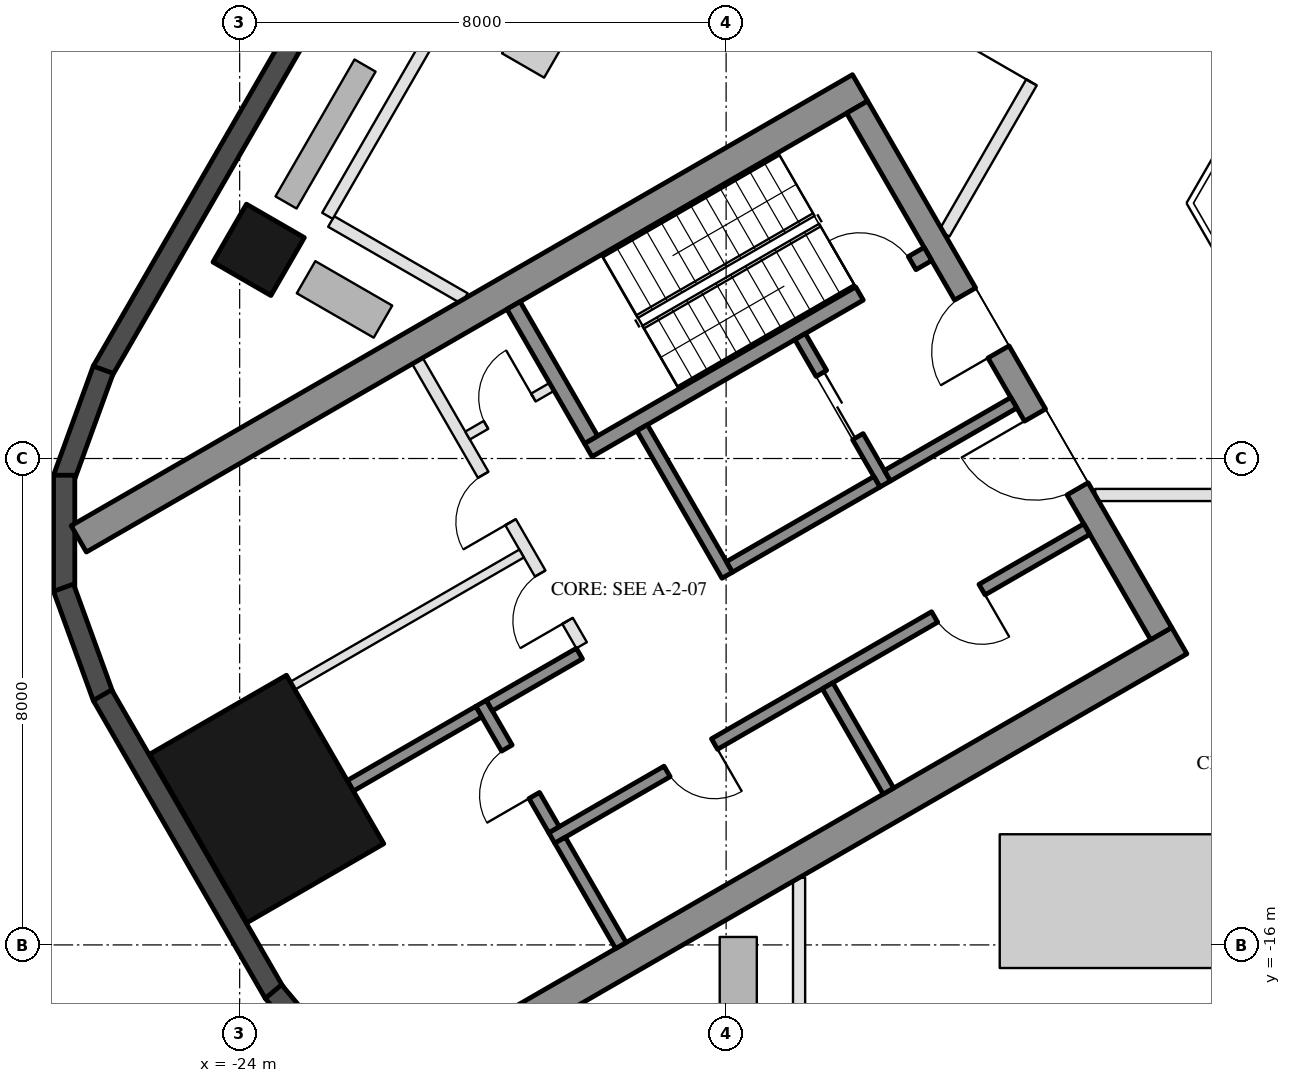
"""IFC4 building model, lengths in metres.
Left out: names, types, materials, properties, quantities, classifications, styles, units other than length and angle.
Written with IfcOpenShell. Run it as: python <this file> out.ifc"""

import sys

from ifc_helpers import new_model, si_unit, direction, frame, frame_2d, origin, origin_2d, place, context, subcontext, project, spatial, rectangle, hollow_rectangle, extrude, boolean, halfspace, element, fill, save


model = new_model("IFC4")
c1 = context("Model", 3, precision=1e-05, world=origin(), true_north=direction((0.0, 1.0)))
c2 = subcontext(c1, "Body", "Model", "MODEL_VIEW")
j1 = project(units=[si_unit("LENGTHUNIT", "METRE"), si_unit("PLANEANGLEUNIT", "RADIAN")], contexts=[c1])
p1 = place(None, origin())
s1 = spatial("IfcSite", under=j1, at=p1, CompositionType="ELEMENT")
p2 = place(p1, origin())
s2 = spatial("IfcBuilding", under=s1, at=p2, CompositionType="ELEMENT")
p3 = place(p2, frame((0.0, 0.0, 37.5)))
s3 = spatial("IfcBuildingStorey", under=s2, at=p3, CompositionType="ELEMENT", Elevation=37.5)
p4 = place(p3, frame((-23.688, -4.568, 0.0), z_axis=(0.0, 0.0, 1.0), x_axis=(0.5, 0.866025403784, 0.0)))
e1 = element("IfcColumn", 1, at=p4, inside=s3, PredefinedType="COLUMN", context=c2, shape_type="SweptSolid", body=[
    boolean("DIFFERENCE", extrude(hollow_rectangle(XDim=1.1, YDim=1.1, WallThickness=0.05, at=origin_2d()), origin(), (0.0, 0.0, 1.0), 4.5), halfspace(frame((0.0, 0.0, 0.007), z_axis=(0.0, 0.0, 1.0), x_axis=(1.0, 0.0, 0.0)), True)),
])
p5 = place(p3, frame((-23.556, -13.6, 0.0), z_axis=(0.0, 0.0, 1.0), x_axis=(-0.5, 0.866025403784, 0.0)))
e2 = element("IfcColumn", 2, at=p5, inside=s3, PredefinedType="COLUMN", context=c2, shape_type="SweptSolid", body=[
    extrude(hollow_rectangle(XDim=3.2, YDim=2.6, WallThickness=0.08, at=origin_2d()), origin(), (0.0, 0.0, 1.0), 4.5),
])
p6 = place(p3, frame((-7.441, 26.022, 0.0), z_axis=(0.0, 0.0, 1.0), x_axis=(-0.499998380999, -0.866026338513, 0.0)))
e3 = element("IfcWall", 3, at=p6, inside=s3, PredefinedType="SOLIDWALL", context=c2, shape_type="SweptSolid", body=[
    extrude(rectangle(XDim=37.631, YDim=0.35, at=frame_2d((18.816, 0.0))), origin(), (0.0, 0.0, 1.0), 4.2),
])
for number, where, z_axis, x_axis in (
    (4, (-26.244, -6.54, 0.0), (0.0, 0.0, 1.0), (-0.342, -0.94, 0.0)),
    (5, (-26.886, -8.275, 0.0), (0.0, 0.0, 1.0), (0.0, -1.0, 0.0)),
    (6, (-26.897, -10.125, 0.0), (0.0, 0.0, 1.0), (0.342, -0.94, 0.0)),
):
    element("IfcWall", number, at=place(p3, frame(where, z_axis=z_axis, x_axis=x_axis)), inside=s3, PredefinedType="SOLIDWALL", context=c2, shape_type="SweptSolid", body=[
        extrude(rectangle(XDim=1.91, YDim=0.35, at=frame_2d((0.955, 0.0))), origin(), (0.0, 0.0, 1.0), 4.2),
    ])
p7 = place(p3, frame((-26.256, -11.893, 0.0), z_axis=(0.0, 0.0, 1.0), x_axis=(0.499986410639, -0.866033249463, 0.0)))
e7 = element("IfcWall", 7, at=p7, inside=s3, PredefinedType="SOLIDWALL", context=c2, shape_type="SweptSolid", body=[
    extrude(rectangle(XDim=5.658, YDim=0.35, at=frame_2d((2.829, 0.0))), origin(), (0.0, 0.0, 1.0), 4.2),
])
p8 = place(p3, frame((-23.445, -16.768, 0.0), z_axis=(0.0, 0.0, 1.0), x_axis=(0.642808304945, -0.766027077259, 0.0)))
e8 = element("IfcWall", 8, at=p8, inside=s3, PredefinedType="SOLIDWALL", context=c2, shape_type="SweptSolid", body=[
    extrude(rectangle(XDim=1.91, YDim=0.35, at=frame_2d((0.955, 0.0))), origin(), (0.0, 0.0, 1.0), 4.2),
])
for number, where, z_axis, x_axis in (
    (9, (-13.797, -1.903, 0.0), (0.0, 0.0, 1.0), (-0.866, -0.5, 0.0)),
    (10, (-8.547, -10.997, 0.0), (0.0, 0.0, 1.0), (-0.866, -0.5, 0.0)),
):
    element("IfcWall", number, at=place(p3, frame(where, z_axis=z_axis, x_axis=x_axis)), inside=s3, PredefinedType="SHEAR", context=c2, shape_type="SweptSolid", body=[
        extrude(rectangle(XDim=14.837, YDim=0.5, at=frame_2d((7.418, 0.0))), origin(), (0.0, 0.0, 1.0), 4.2),
    ])
p9 = place(p3, frame((-13.845, -2.22, 0.0), z_axis=(0.0, 0.0, 1.0), x_axis=(0.500004234368, -0.866022959057, 0.0)))
e11 = element("IfcWall", 11, at=p9, inside=s3, PredefinedType="SHEAR", context=c2, shape_type="SweptSolid", body=[
    extrude(rectangle(XDim=10.0, YDim=0.4, at=frame_2d((5.0, 0.0))), origin(), (0.0, 0.0, 1.0), 4.2),
])
p10 = place(p9, frame((3.55, 0.0, 0.0)))
e12 = element("IfcOpeningElement", 12, at=p10, cuts=e11, PredefinedType="OPENING", context=c2, shape_type="SweptSolid", body=[
    extrude(rectangle(XDim=1.1, YDim=2.1, at=frame_2d((0.55, 1.05))), frame((0.0, 0.21, 0.0), z_axis=(0.0, -1.0, 0.0), x_axis=(1.0, 0.0, 0.0)), (0.0, 0.0, 1.0), 0.42),
])
p11 = place(p9, frame((5.85, 0.0, 0.0)))
e13 = element("IfcOpeningElement", 13, at=p11, cuts=e11, PredefinedType="OPENING", context=c2, shape_type="SweptSolid", body=[
    extrude(rectangle(XDim=1.4, YDim=2.1, at=frame_2d((0.7, 1.05))), frame((0.0, 0.21, 0.0), z_axis=(0.0, -1.0, 0.0), x_axis=(1.0, 0.0, 0.0)), (0.0, 0.0, 1.0), 0.42),
])
p12 = place(p3, frame((-12.681, -4.636, 0.0), z_axis=(0.0, 0.0, 1.0), x_axis=(-0.866021702275, -0.500006411147, 0.0)))
e14 = element("IfcWall", 14, at=p12, inside=s3, PredefinedType="SHEAR", context=c2, shape_type="SweptSolid", body=[
    extrude(rectangle(XDim=6.45, YDim=0.25, at=frame_2d((3.225, 0.0))), origin(), (0.0, 0.0, 1.0), 4.2),
])
p13 = place(p12, frame((0.3, 0.0, 0.0)))
e15 = element("IfcOpeningElement", 15, at=p13, cuts=e14, PredefinedType="OPENING", context=c2, shape_type="SweptSolid", body=[
    extrude(rectangle(XDim=1.0, YDim=2.1, at=frame_2d((0.5, 1.05))), frame((0.0, 0.135, 0.0), z_axis=(0.0, -1.0, 0.0), x_axis=(1.0, 0.0, 0.0)), (0.0, 0.0, 1.0), 0.27),
])
p14 = place(p3, frame((-19.496, -5.482, 0.0), z_axis=(0.0, 0.0, 1.0), x_axis=(0.499990435942, -0.866030925526, 0.0)))
e16 = element("IfcWall", 16, at=p14, inside=s3, PredefinedType="SHEAR", context=c2, shape_type="SweptSolid", body=[
    extrude(rectangle(XDim=2.55, YDim=0.25, at=frame_2d((1.275, 0.0))), origin(), (0.0, 0.0, 1.0), 4.2),
])
p15 = place(p3, frame((-17.381, -7.495, 0.0), z_axis=(0.0, 0.0, 1.0), x_axis=(0.500011755427, -0.866018616679, 0.0)))
e17 = element("IfcWall", 17, at=p15, inside=s3, PredefinedType="SHEAR", context=c2, shape_type="SweptSolid", body=[
    extrude(rectangle(XDim=2.8, YDim=0.2, at=frame_2d((1.4, 0.0))), origin(), (0.0, 0.0, 1.0), 4.2),
])
p16 = place(p3, frame((-14.783, -5.995, 0.0), z_axis=(0.0, 0.0, 1.0), x_axis=(0.49994636267, -0.866056369097, 0.0)))
e18 = element("IfcWall", 18, at=p16, inside=s3, PredefinedType="SHEAR", context=c2, shape_type="SweptSolid", body=[
    extrude(rectangle(XDim=2.8, YDim=0.2, at=frame_2d((1.4, 0.0))), origin(), (0.0, 0.0, 1.0), 4.2),
])
p17 = place(p16, frame((0.7, 0.0, 0.0)))
e19 = element("IfcOpeningElement", 19, at=p17, cuts=e18, PredefinedType="OPENING", context=c2, shape_type="SweptSolid", body=[
    extrude(rectangle(XDim=1.2, YDim=2.1, at=frame_2d((0.6, 1.05))), frame((0.0, 0.11, 0.0), z_axis=(0.0, -1.0, 0.0), x_axis=(1.0, 0.0, 0.0)), (0.0, 0.0, 1.0), 0.22),
])
p18 = place(p3, frame((-13.52, -8.383, 0.0), z_axis=(0.0, 0.0, 1.0), x_axis=(-0.866034573852, -0.49998411664, 0.0)))
e20 = element("IfcWall", 20, at=p18, inside=s3, PredefinedType="SHEAR", context=c2, shape_type="SweptSolid", body=[
    extrude(rectangle(XDim=2.8, YDim=0.2, at=frame_2d((1.4, 0.0))), origin(), (0.0, 0.0, 1.0), 4.2),
])
p19 = place(p3, frame((-11.268, -7.083, 0.0), z_axis=(0.0, 0.0, 1.0), x_axis=(-0.866050077142, -0.499957262057, 0.0)))
e21 = element("IfcWall", 21, at=p19, inside=s3, PredefinedType="SHEAR", context=c2, shape_type="SweptSolid", body=[
    extrude(rectangle(XDim=2.4, YDim=0.2, at=frame_2d((1.2, 0.0))), origin(), (0.0, 0.0, 1.0), 4.2),
])
p20 = place(p3, frame((-10.068, -9.162, 0.0), z_axis=(0.0, 0.0, 1.0), x_axis=(-0.866032725843, -0.499987317609, 0.0)))
e22 = element("IfcWall", 22, at=p20, inside=s3, PredefinedType="SHEAR", context=c2, shape_type="SweptSolid", body=[
    extrude(rectangle(XDim=10.16, YDim=0.2, at=frame_2d((5.08, 0.0))), origin(), (0.0, 0.0, 1.0), 4.2),
])
p21 = place(p20, frame((1.99, 0.0, 0.0)))
e23 = element("IfcOpeningElement", 23, at=p21, cuts=e22, PredefinedType="OPENING", context=c2, shape_type="SweptSolid", body=[
    extrude(rectangle(XDim=0.9, YDim=2.1, at=frame_2d((0.45, 1.05))), frame((0.0, 0.11, 0.0), z_axis=(0.0, -1.0, 0.0), x_axis=(1.0, 0.0, 0.0)), (0.0, 0.0, 1.0), 0.22),
])
p22 = place(p20, frame((7.07, 0.0, 0.0)))
e24 = element("IfcOpeningElement", 24, at=p22, cuts=e22, PredefinedType="OPENING", context=c2, shape_type="SweptSolid", body=[
    extrude(rectangle(XDim=0.9, YDim=2.1, at=frame_2d((0.45, 1.05))), frame((0.0, 0.11, 0.0), z_axis=(0.0, -1.0, 0.0), x_axis=(1.0, 0.0, 0.0)), (0.0, 0.0, 1.0), 0.22),
])
p23 = place(p3, frame((-20.031, -12.026, 0.0), z_axis=(0.0, 0.0, 1.0), x_axis=(0.500033551112, -0.866006032174, 0.0)))
e25 = element("IfcWall", 25, at=p23, inside=s3, PredefinedType="SHEAR", context=c2, shape_type="SweptSolid", body=[
    extrude(rectangle(XDim=2.4, YDim=0.2, at=frame_2d((1.2, 0.0))), origin(), (0.0, 0.0, 1.0), 4.2),
])
p24 = place(p23, frame((0.85, 0.0, 0.0)))
e26 = element("IfcOpeningElement", 26, at=p24, cuts=e25, PredefinedType="OPENING", context=c2, shape_type="SweptSolid", body=[
    extrude(rectangle(XDim=0.9, YDim=2.1, at=frame_2d((0.45, 1.05))), frame((0.0, 0.11, 0.0), z_axis=(0.0, -1.0, 0.0), x_axis=(1.0, 0.0, 0.0)), (0.0, 0.0, 1.0), 0.22),
])
p25 = place(p3, frame((-18.413, -11.208, 0.0), z_axis=(0.0, 0.0, 1.0), x_axis=(-0.866038183914, -0.499977863513, 0.0)))
e27 = element("IfcWall", 27, at=p25, inside=s3, PredefinedType="SHEAR", context=c2, shape_type="SweptSolid", body=[
    extrude(rectangle(XDim=1.71, YDim=0.2, at=frame_2d((0.855, 0.0))), origin(), (0.0, 0.0, 1.0), 4.2),
])
for number, where, z_axis, x_axis in (
    (28, (-14.331, -11.738, 0.0), (0.0, 0.0, 1.0), (0.5, -0.866, 0.0)),
    (29, (-18.73, -14.278, 0.0), (0.0, 0.0, 1.0), (0.5, -0.866, 0.0)),
):
    element("IfcWall", number, at=place(p3, frame(where, z_axis=z_axis, x_axis=x_axis)), inside=s3, PredefinedType="SHEAR", context=c2, shape_type="SweptSolid", body=[
        extrude(rectangle(XDim=2.0, YDim=0.2, at=frame_2d((1.0, 0.0))), origin(), (0.0, 0.0, 1.0), 4.2),
    ])
p26 = place(p3, frame((-20.067, -12.163, 0.0), z_axis=(0.0, 0.0, 1.0), x_axis=(-0.866048967903, -0.499959183527, 0.0)))
e30 = element("IfcWall", 30, at=p26, inside=s3, PredefinedType="SHEAR", context=c2, shape_type="SweptSolid", body=[
    extrude(rectangle(XDim=2.44, YDim=0.2, at=frame_2d((1.22, 0.0))), origin(), (0.0, 0.0, 1.0), 4.2),
])
p27 = place(p3, frame((-21.076, -6.395, 0.0), z_axis=(0.0, 0.0, 1.0), x_axis=(0.50001468107, -0.866016927499, 0.0)))
e31 = element("IfcWall", 31, at=p27, inside=s3, PredefinedType="PARTITIONING", context=c2, shape_type="SweptSolid", body=[
    extrude(rectangle(XDim=5.4, YDim=0.2, at=frame_2d((2.7, 0.0))), origin(), (0.0, 0.0, 1.0), 4.2),
])
p28 = place(p27, frame((2.163, 0.0, 0.0)))
e32 = element("IfcOpeningElement", 32, at=p28, cuts=e31, PredefinedType="OPENING", context=c2, shape_type="SweptSolid", body=[
    extrude(rectangle(XDim=0.9, YDim=2.1, at=frame_2d((0.45, 1.05))), frame((0.0, 0.11, 0.0), z_axis=(0.0, -1.0, 0.0), x_axis=(1.0, 0.0, 0.0)), (0.0, 0.0, 1.0), 0.22),
])
p29 = place(p27, frame((4.038, 0.0, 0.0)))
e33 = element("IfcOpeningElement", 33, at=p29, cuts=e31, PredefinedType="OPENING", context=c2, shape_type="SweptSolid", body=[
    extrude(rectangle(XDim=0.9, YDim=2.1, at=frame_2d((0.45, 1.05))), frame((0.0, 0.11, 0.0), z_axis=(0.0, -1.0, 0.0), x_axis=(1.0, 0.0, 0.0)), (0.0, 0.0, 1.0), 0.22),
])
p30 = place(p3, frame((-18.866, -6.822, 0.0), z_axis=(0.0, 0.0, 1.0), x_axis=(-0.866028054938, -0.499995408039, 0.0)))
e34 = element("IfcWall", 34, at=p30, inside=s3, PredefinedType="PARTITIONING", context=c2, shape_type="SweptSolid", body=[
    extrude(rectangle(XDim=1.6, YDim=0.15, at=frame_2d((0.8, 0.0))), origin(), (0.0, 0.0, 1.0), 4.2),
])
p31 = place(p30, frame((0.35, 0.0, 0.0)))
e35 = element("IfcOpeningElement", 35, at=p31, cuts=e34, PredefinedType="OPENING", context=c2, shape_type="SweptSolid", body=[
    extrude(rectangle(XDim=0.9, YDim=2.1, at=frame_2d((0.45, 1.05))), frame((0.0, 0.085, 0.0), z_axis=(0.0, -1.0, 0.0), x_axis=(1.0, 0.0, 0.0)), (0.0, 0.0, 1.0), 0.17),
])
p32 = place(p3, frame((-19.363, -9.562, 0.0), z_axis=(0.0, 0.0, 1.0), x_axis=(-0.866027639635, -0.499996127374, 0.0)))
e36 = element("IfcWall", 36, at=p32, inside=s3, PredefinedType="PARTITIONING", context=c2, shape_type="SweptSolid", body=[
    extrude(rectangle(XDim=4.35, YDim=0.15, at=frame_2d((2.175, 0.0))), origin(), (0.0, 0.0, 1.0), 4.2),
])
p33 = place(p3, frame((-14.8, -17.43, 0.0), z_axis=(0.0, 0.0, 1.0), x_axis=(0.0, 1.0, 0.0)))
e37 = element("IfcWall", 37, at=p33, inside=s3, PredefinedType="PARTITIONING", context=c2, shape_type="SweptSolid", body=[
    extrude(rectangle(XDim=2.534, YDim=0.2, at=frame_2d((1.267, 0.0))), origin(), (0.0, 0.0, 1.0), 4.2),
])
p34 = place(p3, frame((-9.93, -8.6, 0.0), z_axis=(0.0, 0.0, 1.0), x_axis=(1.0, 0.0, 0.0)))
e38 = element("IfcWall", 38, at=p34, inside=s3, PredefinedType="PARTITIONING", context=c2, shape_type="SweptSolid", body=[
    extrude(rectangle(XDim=19.861, YDim=0.2, at=frame_2d((9.93, 0.0))), origin(), (0.0, 0.0, 1.0), 3.41),
])
p35 = place(p34, frame((2.871, 0.0, 0.0)))
e39 = element("IfcOpeningElement", 39, at=p35, cuts=e38, PredefinedType="OPENING", context=c2, shape_type="SweptSolid", body=[
    extrude(rectangle(XDim=1.2, YDim=2.1, at=frame_2d((0.6, 1.05))), frame((0.0, 0.11, 0.0), z_axis=(0.0, -1.0, 0.0), x_axis=(1.0, 0.0, 0.0)), (0.0, 0.0, 1.0), 0.22),
])
p36 = place(p34, frame((9.581, 0.0, 0.0)))
e40 = element("IfcOpeningElement", 40, at=p36, cuts=e38, PredefinedType="OPENING", context=c2, shape_type="SweptSolid", body=[
    extrude(rectangle(XDim=1.2, YDim=2.1, at=frame_2d((0.6, 1.05))), frame((0.0, 0.11, 0.0), z_axis=(0.0, -1.0, 0.0), x_axis=(1.0, 0.0, 0.0)), (0.0, 0.0, 1.0), 0.22),
])
p37 = place(p34, frame((16.04, 0.0, 0.0)))
e41 = element("IfcOpeningElement", 41, at=p37, cuts=e38, PredefinedType="OPENING", context=c2, shape_type="SweptSolid", body=[
    extrude(rectangle(XDim=1.2, YDim=2.1, at=frame_2d((0.6, 1.05))), frame((0.0, 0.11, 0.0), z_axis=(0.0, -1.0, 0.0), x_axis=(1.0, 0.0, 0.0)), (0.0, 0.0, 1.0), 0.22),
])
p38 = place(p3, frame((-22.495, -4.102, 0.0), z_axis=(0.0, 0.0, 1.0), x_axis=(0.866065287345, -0.499930913282, 0.0)))
e42 = element("IfcWall", 42, at=p38, inside=s3, PredefinedType="PARTITIONING", context=c2, shape_type="SweptSolid", body=[
    extrude(rectangle(XDim=2.534, YDim=0.2, at=frame_2d((1.267, 0.0))), origin(), (0.0, 0.0, 1.0), 4.2),
])
p39 = place(p3, frame((-7.806, 21.539, 0.0), z_axis=(0.0, 0.0, 1.0), x_axis=(-0.500002084189, -0.866024200474, 0.0)))
e43 = element("IfcWall", 43, at=p39, inside=s3, PredefinedType="PARTITIONING", context=c2, shape_type="SweptSolid", body=[
    extrude(rectangle(XDim=29.5, YDim=0.2, at=frame_2d((14.75, 0.0))), origin(), (0.0, 0.0, 1.0), 3.41),
])
p40 = place(p3, frame((-2.482, 12.9, 0.0), z_axis=(0.0, 0.0, 1.0), x_axis=(-0.50000478328, -0.866022642139, 0.0)))
e44 = element("IfcWall", 44, at=p40, inside=s3, PredefinedType="PARTITIONING", context=c2, shape_type="SweptSolid", body=[
    extrude(rectangle(XDim=19.861, YDim=0.2, at=frame_2d((9.931, 0.0))), origin(), (0.0, 0.0, 1.0), 3.41),
])
p41 = place(p40, frame((3.121, 0.0, 0.0)))
e45 = element("IfcOpeningElement", 45, at=p41, cuts=e44, PredefinedType="OPENING", context=c2, shape_type="SweptSolid", body=[
    extrude(rectangle(XDim=1.2, YDim=2.1, at=frame_2d((0.6, 1.05))), frame((0.0, 0.11, 0.0), z_axis=(0.0, -1.0, 0.0), x_axis=(1.0, 0.0, 0.0)), (0.0, 0.0, 1.0), 0.22),
])
p42 = place(p40, frame((9.581, 0.0, 0.0)))
e46 = element("IfcOpeningElement", 46, at=p42, cuts=e44, PredefinedType="OPENING", context=c2, shape_type="SweptSolid", body=[
    extrude(rectangle(XDim=1.2, YDim=2.1, at=frame_2d((0.6, 1.05))), frame((0.0, 0.11, 0.0), z_axis=(0.0, -1.0, 0.0), x_axis=(1.0, 0.0, 0.0)), (0.0, 0.0, 1.0), 0.22),
])
p43 = place(p40, frame((15.79, 0.0, 0.0)))
e47 = element("IfcOpeningElement", 47, at=p43, cuts=e44, PredefinedType="OPENING", context=c2, shape_type="SweptSolid", body=[
    extrude(rectangle(XDim=1.2, YDim=2.1, at=frame_2d((0.6, 1.05))), frame((0.0, 0.11, 0.0), z_axis=(0.0, -1.0, 0.0), x_axis=(1.0, 0.0, 0.0)), (0.0, 0.0, 1.0), 0.22),
])
p44 = place(p17, origin())
e48 = element("IfcDoor", 48, at=p44, inside=s3, OperationType="DOUBLE_DOOR_SLIDING", PredefinedType="DOOR", context=c2, shape_type="SweptSolid", body=[
    extrude(rectangle(XDim=1.2, YDim=2.1, at=frame_2d((0.6, 1.05))), frame((0.0, 0.025, 0.0), z_axis=(0.0, -1.0, 0.0), x_axis=(1.0, 0.0, 0.0)), (0.0, 0.0, 1.0), 0.05),
])
fill(e19, e48)
p45 = place(p31, frame((0.9, 0.0, 0.0), z_axis=(0.0, 0.0, 1.0), x_axis=(-1.0, 0.0, 0.0)))
e49 = element("IfcDoor", 49, at=p45, inside=s3, OperationType="SINGLE_SWING_RIGHT", PredefinedType="DOOR", context=c2, shape_type="SweptSolid", body=[
    extrude(rectangle(XDim=0.9, YDim=2.1, at=frame_2d((0.45, 1.05))), frame((0.0, 0.025, 0.0), z_axis=(0.0, -1.0, 0.0), x_axis=(1.0, 0.0, 0.0)), (0.0, 0.0, 1.0), 0.05),
])
fill(e35, e49)
p46 = place(p21, origin())
e50 = element("IfcDoor", 50, at=p46, inside=s3, OperationType="SINGLE_SWING_LEFT", PredefinedType="DOOR", context=c2, shape_type="SweptSolid", body=[
    extrude(rectangle(XDim=0.9, YDim=2.1, at=frame_2d((0.45, 1.05))), frame((0.0, 0.025, 0.0), z_axis=(0.0, -1.0, 0.0), x_axis=(1.0, 0.0, 0.0)), (0.0, 0.0, 1.0), 0.05),
])
fill(e23, e50)
p47 = place(p22, origin())
e51 = element("IfcDoor", 51, at=p47, inside=s3, OperationType="SINGLE_SWING_LEFT", PredefinedType="DOOR", context=c2, shape_type="SweptSolid", body=[
    extrude(rectangle(XDim=0.9, YDim=2.1, at=frame_2d((0.45, 1.05))), frame((0.0, 0.025, 0.0), z_axis=(0.0, -1.0, 0.0), x_axis=(1.0, 0.0, 0.0)), (0.0, 0.0, 1.0), 0.05),
])
fill(e24, e51)
p48 = place(p24, frame((0.9, 0.0, 0.0), z_axis=(0.0, 0.0, 1.0), x_axis=(-1.0, 0.0, 0.0)))
e52 = element("IfcDoor", 52, at=p48, inside=s3, OperationType="SINGLE_SWING_LEFT", PredefinedType="DOOR", context=c2, shape_type="SweptSolid", body=[
    extrude(rectangle(XDim=0.9, YDim=2.1, at=frame_2d((0.45, 1.05))), frame((0.0, 0.025, 0.0), z_axis=(0.0, -1.0, 0.0), x_axis=(1.0, 0.0, 0.0)), (0.0, 0.0, 1.0), 0.05),
])
fill(e26, e52)
p49 = place(p28, frame((0.9, 0.0, 0.0), z_axis=(0.0, 0.0, 1.0), x_axis=(-1.0, 0.0, 0.0)))
e53 = element("IfcDoor", 53, at=p49, inside=s3, OperationType="SINGLE_SWING_LEFT", PredefinedType="DOOR", context=c2, shape_type="SweptSolid", body=[
    extrude(rectangle(XDim=0.9, YDim=2.1, at=frame_2d((0.45, 1.05))), frame((0.0, 0.025, 0.0), z_axis=(0.0, -1.0, 0.0), x_axis=(1.0, 0.0, 0.0)), (0.0, 0.0, 1.0), 0.05),
])
fill(e32, e53)
p50 = place(p29, frame((0.9, 0.0, 0.0), z_axis=(0.0, 0.0, 1.0), x_axis=(-1.0, 0.0, 0.0)))
e54 = element("IfcDoor", 54, at=p50, inside=s3, OperationType="SINGLE_SWING_LEFT", PredefinedType="DOOR", context=c2, shape_type="SweptSolid", body=[
    extrude(rectangle(XDim=0.9, YDim=2.1, at=frame_2d((0.45, 1.05))), frame((0.0, 0.025, 0.0), z_axis=(0.0, -1.0, 0.0), x_axis=(1.0, 0.0, 0.0)), (0.0, 0.0, 1.0), 0.05),
])
fill(e33, e54)
p51 = place(p10, frame((1.1, 0.0, 0.0), z_axis=(0.0, 0.0, 1.0), x_axis=(-1.0, 0.0, 0.0)))
e55 = element("IfcDoor", 55, at=p51, inside=s3, OperationType="SINGLE_SWING_LEFT", PredefinedType="DOOR", context=c2, shape_type="SweptSolid", body=[
    extrude(rectangle(XDim=1.1, YDim=2.1, at=frame_2d((0.55, 1.05))), frame((0.0, 0.025, 0.0), z_axis=(0.0, -1.0, 0.0), x_axis=(1.0, 0.0, 0.0)), (0.0, 0.0, 1.0), 0.05),
])
fill(e12, e55)
p52 = place(p11, frame((1.4, 0.0, 0.0), z_axis=(0.0, 0.0, 1.0), x_axis=(-1.0, 0.0, 0.0)))
e56 = element("IfcDoor", 56, at=p52, inside=s3, OperationType="DOUBLE_DOOR_SINGLE_SWING", PredefinedType="DOOR", context=c2, shape_type="SweptSolid", body=[
    extrude(rectangle(XDim=1.4, YDim=2.1, at=frame_2d((0.7, 1.05))), frame((0.0, 0.025, 0.0), z_axis=(0.0, -1.0, 0.0), x_axis=(1.0, 0.0, 0.0)), (0.0, 0.0, 1.0), 0.05),
])
fill(e13, e56)
p53 = place(p13, frame((1.0, 0.0, 0.0), z_axis=(0.0, 0.0, 1.0), x_axis=(-1.0, 0.0, 0.0)))
e57 = element("IfcDoor", 57, at=p53, inside=s3, OperationType="SINGLE_SWING_LEFT", PredefinedType="DOOR", context=c2, shape_type="SweptSolid", body=[
    extrude(rectangle(XDim=1.0, YDim=2.1, at=frame_2d((0.5, 1.05))), frame((0.0, 0.025, 0.0), z_axis=(0.0, -1.0, 0.0), x_axis=(1.0, 0.0, 0.0)), (0.0, 0.0, 1.0), 0.05),
])
fill(e15, e57)
p54 = place(p43, frame((1.2, 0.0, 0.0), z_axis=(0.0, 0.0, 1.0), x_axis=(-1.0, 0.0, 0.0)))
e58 = element("IfcDoor", 58, at=p54, inside=s3, OperationType="SINGLE_SWING_LEFT", PredefinedType="DOOR", context=c2, shape_type="SweptSolid", body=[
    extrude(rectangle(XDim=1.2, YDim=2.1, at=frame_2d((0.6, 1.05))), frame((0.0, 0.025, 0.0), z_axis=(0.0, -1.0, 0.0), x_axis=(1.0, 0.0, 0.0)), (0.0, 0.0, 1.0), 0.05),
])
fill(e47, e58)
save(model, sys.argv[1])
